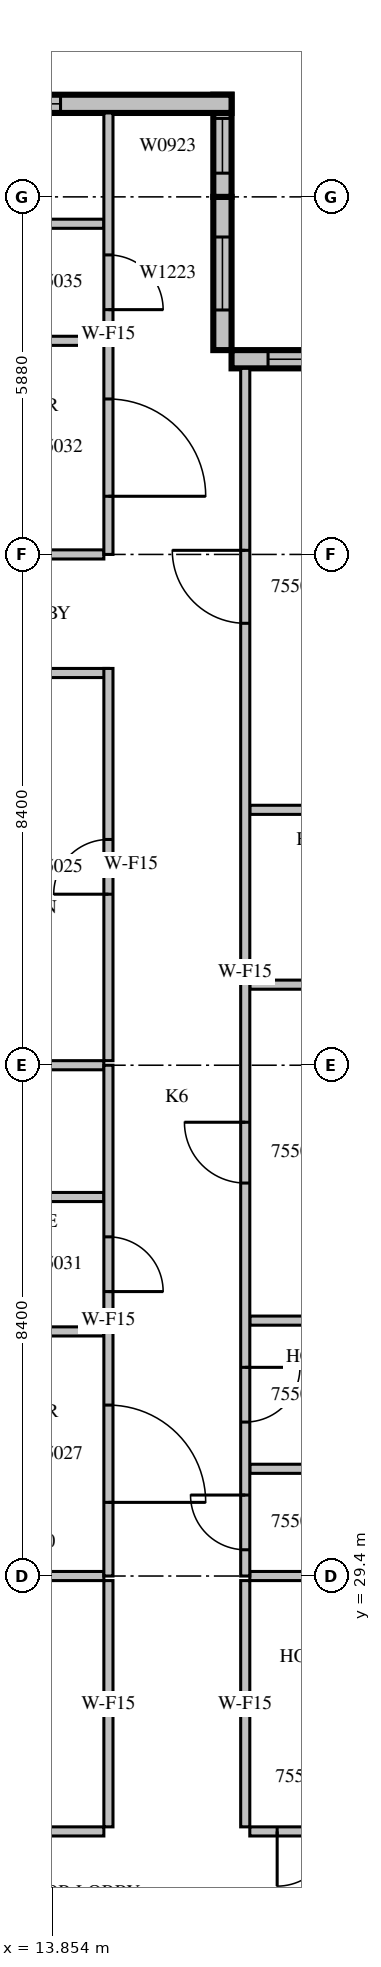
"""IFC4 building model, lengths in metres.
Left out: names, types, materials, properties, quantities, classifications, styles, units other than length and angle.
Written with IfcOpenShell. Run it as: python <this file> out.ifc"""

import sys

from ifc_helpers import new_model, si_unit, direction, frame, frame_2d, origin, place, context, subcontext, project, spatial, rectangle, extrude, source, transform, mapped, element, fill, save


model = new_model("IFC4")
c1 = context("Model", 3, precision=1e-05, world=origin(), true_north=direction((0.0, 1.0)))
c2 = subcontext(c1, "Body", "Model", "MODEL_VIEW")
j1 = project(units=[si_unit("LENGTHUNIT", "METRE"), si_unit("PLANEANGLEUNIT", "RADIAN")], contexts=[c1])
p1 = place(None, origin())
s1 = spatial("IfcSite", under=j1, at=p1, CompositionType="ELEMENT")
p2 = place(p1, origin())
s2 = spatial("IfcBuilding", under=s1, at=p2, CompositionType="ELEMENT")
p3 = place(p2, frame((0.0, 0.0, 242.4)))
s3 = spatial("IfcBuildingStorey", under=s2, at=p3, CompositionType="ELEMENT", Elevation=242.4)
m1 = source(origin(), c2, "Body", "SweptSolid", [
    extrude(rectangle(XDim=4.2, YDim=0.3, at=frame_2d((2.1, 0.0))), origin(), (0.0, 0.0, 1.0), 3.4),
])
p4 = place(p3, frame((21.0, 49.41, 0.0), z_axis=(0.0, 0.0, 1.0), x_axis=(-1.0, 0.0, 0.0)))
e1 = element("IfcWall", 1, at=p4, inside=s3, PredefinedType="STANDARD", context=c2, shape_type="MappedRepresentation", body=[
    mapped(m1, transform((0.0, 0.0, 0.0), scale=1.0)),
])
m2 = source(origin(), c2, "Body", "SweptSolid", [
    extrude(rectangle(XDim=3.0, YDim=2.3, at=frame_2d((1.5, 1.15))), frame((0.0, 0.16, 0.0), z_axis=(0.0, -1.0, 0.0), x_axis=(1.0, 0.0, 0.0)), (0.0, 0.0, 1.0), 0.32),
])
p5 = place(p4, frame((0.6, 0.0, 0.6)))
e2 = element("IfcOpeningElement", 2, at=p5, cuts=e1, PredefinedType="OPENING", context=c2, shape_type="MappedRepresentation", body=[
    mapped(m2, transform((0.0, 0.0, 0.0), scale=1.0)),
])
m3 = source(origin(), c2, "Body", "SweptSolid", [
    extrude(rectangle(XDim=2.52, YDim=0.3, at=frame_2d((1.26, 0.0))), origin(), (0.0, 0.0, 1.0), 3.4),
])
p6 = place(p3, frame((16.65, 49.56, 0.0), z_axis=(0.0, 0.0, 1.0), x_axis=(0.0, 1.0, 0.0)))
e3 = element("IfcWall", 3, at=p6, inside=s3, PredefinedType="STANDARD", context=c2, shape_type="MappedRepresentation", body=[
    mapped(m3, transform((0.0, 0.0, 0.0), scale=1.0)),
])
m4 = source(origin(), c2, "Body", "SweptSolid", [
    extrude(rectangle(XDim=1.2, YDim=2.3, at=frame_2d((0.6, 1.15))), frame((0.0, 0.16, 0.0), z_axis=(0.0, -1.0, 0.0), x_axis=(1.0, 0.0, 0.0)), (0.0, 0.0, 1.0), 0.32),
])
p7 = place(p6, frame((0.66, 0.0, 0.6)))
e4 = element("IfcOpeningElement", 4, at=p7, cuts=e3, PredefinedType="OPENING", context=c2, shape_type="MappedRepresentation", body=[
    mapped(m4, transform((0.0, 0.0, 0.0), scale=1.0)),
])
m5 = source(origin(), c2, "Body", "SweptSolid", [
    extrude(rectangle(XDim=1.68, YDim=0.3, at=frame_2d((0.84, 0.0))), origin(), (0.0, 0.0, 1.0), 3.4),
])
p8 = place(p3, frame((16.65, 52.08, 0.0), z_axis=(0.0, 0.0, 1.0), x_axis=(0.0, 1.0, 0.0)))
e5 = element("IfcWall", 5, at=p8, inside=s3, PredefinedType="STANDARD", context=c2, shape_type="MappedRepresentation", body=[
    mapped(m5, transform((0.0, 0.0, 0.0), scale=1.0)),
])
m6 = source(origin(), c2, "Body", "SweptSolid", [
    extrude(rectangle(XDim=0.9, YDim=2.3, at=frame_2d((0.45, 1.15))), frame((0.0, 0.16, 0.0), z_axis=(0.0, -1.0, 0.0), x_axis=(1.0, 0.0, 0.0)), (0.0, 0.0, 1.0), 0.32),
])
p9 = place(p8, frame((0.39, 0.0, 0.6)))
e6 = element("IfcOpeningElement", 6, at=p9, cuts=e5, PredefinedType="OPENING", context=c2, shape_type="MappedRepresentation", body=[
    mapped(m6, transform((0.0, 0.0, 0.0), scale=1.0)),
])
m7 = source(origin(), c2, "Body", "SweptSolid", [
    extrude(rectangle(XDim=10.5, YDim=0.3, at=frame_2d((5.25, 0.0))), origin(), (0.0, 0.0, 1.0), 3.4),
])
p10 = place(p3, frame((16.8, 53.61, 0.0), z_axis=(0.0, 0.0, 1.0), x_axis=(-1.0, 0.0, 0.0)))
e7 = element("IfcWall", 7, at=p10, inside=s3, PredefinedType="STANDARD", context=c2, shape_type="MappedRepresentation", body=[
    mapped(m7, transform((0.0, 0.0, 0.0), scale=1.0)),
])
m8 = source(origin(), c2, "Body", "SweptSolid", [
    extrude(rectangle(XDim=1.8, YDim=2.3, at=frame_2d((0.9, 1.15))), frame((0.0, 0.16, 0.0), z_axis=(0.0, -1.0, 0.0), x_axis=(1.0, 0.0, 0.0)), (0.0, 0.0, 1.0), 0.32),
])
p11 = place(p10, frame((8.025, 0.0, 0.6)))
e8 = element("IfcOpeningElement", 8, at=p11, cuts=e7, PredefinedType="OPENING", context=c2, shape_type="MappedRepresentation", body=[
    mapped(m8, transform((0.0, 0.0, 0.0), scale=1.0)),
])
m9 = source(origin(), c2, "Body", "SweptSolid", [
    extrude(rectangle(XDim=2.4, YDim=2.3, at=frame_2d((1.2, 1.15))), frame((0.0, 0.16, 0.0), z_axis=(0.0, -1.0, 0.0), x_axis=(1.0, 0.0, 0.0)), (0.0, 0.0, 1.0), 0.32),
])
p12 = place(p10, frame((2.812, 0.0, 0.6)))
e9 = element("IfcOpeningElement", 9, at=p12, cuts=e7, PredefinedType="OPENING", context=c2, shape_type="MappedRepresentation", body=[
    mapped(m9, transform((0.0, 0.0, 0.0), scale=1.0)),
])
m10 = source(origin(), c2, "Body", "SweptSolid", [
    extrude(rectangle(XDim=8.195, YDim=0.15, at=frame_2d((4.098, 0.0))), origin(), (0.0, 0.0, 1.0), 3.4),
])
p13 = place(p3, frame((6.505, 25.2, 0.0), z_axis=(0.0, 0.0, 1.0), x_axis=(1.0, 0.0, 0.0)))
e10 = element("IfcWall", 10, at=p13, inside=s3, PredefinedType="PARTITIONING", context=c2, shape_type="MappedRepresentation", body=[
    mapped(m10, transform((0.0, 0.0, 0.0), scale=1.0)),
])
m11 = source(origin(), c2, "Body", "SweptSolid", [
    extrude(rectangle(XDim=0.9, YDim=2.1, at=frame_2d((0.45, 1.05))), frame((0.0, 0.085, 0.0), z_axis=(0.0, -1.0, 0.0), x_axis=(1.0, 0.0, 0.0)), (0.0, 0.0, 1.0), 0.17),
])
p14 = place(p13, frame((1.045, 0.0, 0.0)))
e11 = element("IfcOpeningElement", 11, at=p14, cuts=e10, PredefinedType="OPENING", context=c2, shape_type="MappedRepresentation", body=[
    mapped(m11, transform((0.0, 0.0, 0.0), scale=1.0)),
])
p15 = place(p13, frame((5.97, 0.0, 0.0)))
e12 = element("IfcOpeningElement", 12, at=p15, cuts=e10, PredefinedType="OPENING", context=c2, shape_type="MappedRepresentation", body=[
    mapped(m11, transform((0.0, 0.0, 0.0), scale=1.0)),
])
m12 = source(origin(), c2, "Body", "SweptSolid", [
    extrude(rectangle(XDim=3.6, YDim=0.15, at=frame_2d((1.8, 0.0))), origin(), (0.0, 0.0, 1.0), 3.4),
])
p16 = place(p3, frame((17.1, 25.2, 0.0), z_axis=(0.0, 0.0, 1.0), x_axis=(1.0, 0.0, 0.0)))
e13 = element("IfcWall", 13, at=p16, inside=s3, PredefinedType="PARTITIONING", context=c2, shape_type="MappedRepresentation", body=[
    mapped(m12, transform((0.0, 0.0, 0.0), scale=1.0)),
])
p17 = place(p16, frame((0.45, 0.0, 0.0)))
e14 = element("IfcOpeningElement", 14, at=p17, cuts=e13, PredefinedType="OPENING", context=c2, shape_type="MappedRepresentation", body=[
    mapped(m11, transform((0.0, 0.0, 0.0), scale=1.0)),
])
m13 = source(origin(), c2, "Body", "SweptSolid", [
    extrude(rectangle(XDim=4.05, YDim=0.15, at=frame_2d((2.025, 0.0))), origin(), (0.0, 0.0, 1.0), 3.4),
])
for number, where, z_axis, x_axis in (
    (15, (14.775, 25.275, 0.0), (0.0, 0.0, 1.0), (0.0, 1.0, 0.0)),
    (16, (17.025, 29.325, 0.0), (0.0, 0.0, 1.0), (0.0, -1.0, 0.0)),
):
    element("IfcWall", number, at=place(p3, frame(where, z_axis=z_axis, x_axis=x_axis)), inside=s3, PredefinedType="PARTITIONING", context=c2, shape_type="MappedRepresentation", body=[
        mapped(m13, transform((0.0, 0.0, 0.0), scale=1.0)),
    ])
m14 = source(origin(), c2, "Body", "SweptSolid", [
    extrude(rectangle(XDim=3.801, YDim=0.15, at=frame_2d((1.901, 0.0))), origin(), (0.0, 0.0, 1.0), 3.4),
])
p18 = place(p3, frame((14.7, 29.4, 0.0), z_axis=(0.0, 0.0, 1.0), x_axis=(-1.0, 0.0, 0.0)))
e17 = element("IfcWall", 17, at=p18, inside=s3, PredefinedType="PARTITIONING", context=c2, shape_type="MappedRepresentation", body=[
    mapped(m14, transform((0.0, 0.0, 0.0), scale=1.0)),
])
m15 = source(origin(), c2, "Body", "SweptSolid", [
    extrude(rectangle(XDim=3.101, YDim=0.15, at=frame_2d((1.55, 0.0))), origin(), (0.0, 0.0, 1.0), 3.4),
])
p19 = place(p3, frame((20.201, 29.4, 0.0), z_axis=(0.0, 0.0, 1.0), x_axis=(-1.0, 0.0, 0.0)))
e18 = element("IfcWall", 18, at=p19, inside=s3, PredefinedType="PARTITIONING", context=c2, shape_type="MappedRepresentation", body=[
    mapped(m15, transform((0.0, 0.0, 0.0), scale=1.0)),
])
m16 = source(origin(), c2, "Body", "SweptSolid", [
    extrude(rectangle(XDim=3.275, YDim=0.15, at=frame_2d((1.637, 0.0))), origin(), (0.0, 0.0, 1.0), 3.4),
])
p20 = place(p3, frame((14.775, 44.25, 0.0), z_axis=(0.0, 0.0, 1.0), x_axis=(-1.0, 0.0, 0.0)))
e19 = element("IfcWall", 19, at=p20, inside=s3, PredefinedType="PARTITIONING", context=c2, shape_type="MappedRepresentation", body=[
    mapped(m16, transform((0.0, 0.0, 0.0), scale=1.0)),
])
m17 = source(origin(), c2, "Body", "SweptSolid", [
    extrude(rectangle(XDim=6.45, YDim=0.15, at=frame_2d((3.225, 0.0))), origin(), (0.0, 0.0, 1.0), 3.4),
])
p21 = place(p3, frame((14.775, 37.875, 0.0), z_axis=(0.0, 0.0, 1.0), x_axis=(0.0, 1.0, 0.0)))
e20 = element("IfcWall", 20, at=p21, inside=s3, PredefinedType="PARTITIONING", context=c2, shape_type="MappedRepresentation", body=[
    mapped(m17, transform((0.0, 0.0, 0.0), scale=1.0)),
])
p22 = place(p21, frame((2.737, 0.0, 0.0)))
e21 = element("IfcOpeningElement", 21, at=p22, cuts=e20, PredefinedType="OPENING", context=c2, shape_type="MappedRepresentation", body=[
    mapped(m11, transform((0.0, 0.0, 0.0), scale=1.0)),
])
m18 = source(origin(), c2, "Body", "SweptSolid", [
    extrude(rectangle(XDim=3.65, YDim=0.15, at=frame_2d((1.825, 0.0))), origin(), (0.0, 0.0, 1.0), 3.4),
])
for number, where, z_axis, x_axis in (
    (22, (14.7, 33.422, 0.0), (0.0, 0.0, 1.0), (-1.0, 0.0, 0.0)),
    (23, (14.7, 35.633, 0.0), (0.0, 0.0, 1.0), (-1.0, 0.0, 0.0)),
    (24, (14.7, 37.8, 0.0), (0.0, 0.0, 1.0), (-1.0, 0.0, 0.0)),
    (25, (14.7, 49.713, 0.0), (0.0, 0.0, 1.0), (-1.0, 0.0, 0.0)),
):
    element("IfcWall", number, at=place(p3, frame(where, z_axis=z_axis, x_axis=x_axis)), inside=s3, PredefinedType="PARTITIONING", context=c2, shape_type="MappedRepresentation", body=[
        mapped(m18, transform((0.0, 0.0, 0.0), scale=1.0)),
    ])
p23 = place(p3, frame((14.7, 51.638, 0.0), z_axis=(0.0, 0.0, 1.0), x_axis=(-1.0, 0.0, 0.0)))
e26 = element("IfcWall", 26, at=p23, inside=s3, PredefinedType="PARTITIONING", context=c2, shape_type="MappedRepresentation", body=[
    mapped(m18, transform((0.0, 0.0, 0.0), scale=1.0)),
])
p24 = place(p23, frame((1.375, 0.0, 0.0)))
e27 = element("IfcOpeningElement", 27, at=p24, cuts=e26, PredefinedType="OPENING", context=c2, shape_type="MappedRepresentation", body=[
    mapped(m11, transform((0.0, 0.0, 0.0), scale=1.0)),
])
p25 = place(p3, frame((14.7, 46.2, 0.0), z_axis=(0.0, 0.0, 1.0), x_axis=(-1.0, 0.0, 0.0)))
e28 = element("IfcWall", 28, at=p25, inside=s3, PredefinedType="PARTITIONING", context=c2, shape_type="MappedRepresentation", body=[
    mapped(m18, transform((0.0, 0.0, 0.0), scale=1.0)),
])
p26 = place(p3, frame((17.1, 31.163, 0.0), z_axis=(0.0, 0.0, 1.0), x_axis=(1.0, 0.0, 0.0)))
e29 = element("IfcWall", 29, at=p26, inside=s3, PredefinedType="PARTITIONING", context=c2, shape_type="MappedRepresentation", body=[
    mapped(m12, transform((0.0, 0.0, 0.0), scale=1.0)),
])
p27 = place(p3, frame((17.1, 39.125, 0.0), z_axis=(0.0, 0.0, 1.0), x_axis=(1.0, 0.0, 0.0)))
e30 = element("IfcWall", 30, at=p27, inside=s3, PredefinedType="PARTITIONING", context=c2, shape_type="MappedRepresentation", body=[
    mapped(m12, transform((0.0, 0.0, 0.0), scale=1.0)),
])
p28 = place(p27, frame((1.35, 0.0, 0.0)))
e31 = element("IfcOpeningElement", 31, at=p28, cuts=e30, PredefinedType="OPENING", context=c2, shape_type="MappedRepresentation", body=[
    mapped(m11, transform((0.0, 0.0, 0.0), scale=1.0)),
])
for number, where, z_axis, x_axis in (
    (32, (20.7, 33.6, 0.0), (0.0, 0.0, 1.0), (-1.0, 0.0, 0.0)),
    (33, (20.7, 42.0, 0.0), (0.0, 0.0, 1.0), (-1.0, 0.0, 0.0)),
):
    element("IfcWall", number, at=place(p3, frame(where, z_axis=z_axis, x_axis=x_axis)), inside=s3, PredefinedType="PARTITIONING", context=c2, shape_type="MappedRepresentation", body=[
        mapped(m12, transform((0.0, 0.0, 0.0), scale=1.0)),
    ])
m19 = source(origin(), c2, "Body", "SweptSolid", [
    extrude(rectangle(XDim=8.4, YDim=0.15, at=frame_2d((4.2, 0.0))), origin(), (0.0, 0.0, 1.0), 3.4),
])
p29 = place(p3, frame((14.775, 29.4, 0.0), z_axis=(0.0, 0.0, 1.0), x_axis=(0.0, 1.0, 0.0)))
e34 = element("IfcWall", 34, at=p29, inside=s3, PredefinedType="PARTITIONING", context=c2, shape_type="MappedRepresentation", body=[
    mapped(m19, transform((0.0, 0.0, 0.0), scale=1.0)),
])
m20 = source(origin(), c2, "Body", "SweptSolid", [
    extrude(rectangle(XDim=1.6, YDim=2.1, at=frame_2d((0.8, 1.05))), frame((0.0, 0.085, 0.0), z_axis=(0.0, -1.0, 0.0), x_axis=(1.0, 0.0, 0.0)), (0.0, 0.0, 1.0), 0.17),
])
p30 = place(p29, frame((1.211, 0.0, 0.0)))
e35 = element("IfcOpeningElement", 35, at=p30, cuts=e34, PredefinedType="OPENING", context=c2, shape_type="MappedRepresentation", body=[
    mapped(m20, transform((0.0, 0.0, 0.0), scale=1.0)),
])
p31 = place(p29, frame((4.678, 0.0, 0.0)))
e36 = element("IfcOpeningElement", 36, at=p31, cuts=e34, PredefinedType="OPENING", context=c2, shape_type="MappedRepresentation", body=[
    mapped(m11, transform((0.0, 0.0, 0.0), scale=1.0)),
])
m21 = source(origin(), c2, "Body", "SweptSolid", [
    extrude(rectangle(XDim=7.26, YDim=0.15, at=frame_2d((3.63, 0.0))), origin(), (0.0, 0.0, 1.0), 3.4),
])
p32 = place(p3, frame((14.775, 46.2, 0.0), z_axis=(0.0, 0.0, 1.0), x_axis=(0.0, 1.0, 0.0)))
e37 = element("IfcWall", 37, at=p32, inside=s3, PredefinedType="PARTITIONING", context=c2, shape_type="MappedRepresentation", body=[
    mapped(m21, transform((0.0, 0.0, 0.0), scale=1.0)),
])
p33 = place(p32, frame((0.956, 0.0, 0.0)))
e38 = element("IfcOpeningElement", 38, at=p33, cuts=e37, PredefinedType="OPENING", context=c2, shape_type="MappedRepresentation", body=[
    mapped(m20, transform((0.0, 0.0, 0.0), scale=1.0)),
])
p34 = place(p32, frame((4.025, 0.0, 0.0)))
e39 = element("IfcOpeningElement", 39, at=p34, cuts=e37, PredefinedType="OPENING", context=c2, shape_type="MappedRepresentation", body=[
    mapped(m11, transform((0.0, 0.0, 0.0), scale=1.0)),
])
m22 = source(origin(), c2, "Body", "SweptSolid", [
    extrude(rectangle(XDim=19.86, YDim=0.15, at=frame_2d((9.93, 0.0))), origin(), (0.0, 0.0, 1.0), 3.4),
])
p35 = place(p3, frame((17.025, 49.26, 0.0), z_axis=(0.0, 0.0, 1.0), x_axis=(0.0, -1.0, 0.0)))
e40 = element("IfcWall", 40, at=p35, inside=s3, PredefinedType="PARTITIONING", context=c2, shape_type="MappedRepresentation", body=[
    mapped(m22, transform((0.0, 0.0, 0.0), scale=1.0)),
])
p36 = place(p35, frame((18.528, 0.0, 0.0)))
e41 = element("IfcOpeningElement", 41, at=p36, cuts=e40, PredefinedType="OPENING", context=c2, shape_type="MappedRepresentation", body=[
    mapped(m11, transform((0.0, 0.0, 0.0), scale=1.0)),
])
p37 = place(p35, frame((16.428, 0.0, 0.0)))
e42 = element("IfcOpeningElement", 42, at=p37, cuts=e40, PredefinedType="OPENING", context=c2, shape_type="MappedRepresentation", body=[
    mapped(m11, transform((0.0, 0.0, 0.0), scale=1.0)),
])
m23 = source(origin(), c2, "Body", "SweptSolid", [
    extrude(rectangle(XDim=1.0, YDim=2.1, at=frame_2d((0.5, 1.05))), frame((0.0, 0.085, 0.0), z_axis=(0.0, -1.0, 0.0), x_axis=(1.0, 0.0, 0.0)), (0.0, 0.0, 1.0), 0.17),
])
p38 = place(p35, frame((12.398, 0.0, 0.0)))
e43 = element("IfcOpeningElement", 43, at=p38, cuts=e40, PredefinedType="OPENING", context=c2, shape_type="MappedRepresentation", body=[
    mapped(m23, transform((0.0, 0.0, 0.0), scale=1.0)),
])
m24 = source(origin(), c2, "Body", "SweptSolid", [
    extrude(rectangle(XDim=1.2, YDim=2.1, at=frame_2d((0.6, 1.05))), frame((0.0, 0.085, 0.0), z_axis=(0.0, -1.0, 0.0), x_axis=(1.0, 0.0, 0.0)), (0.0, 0.0, 1.0), 0.17),
])
p39 = place(p35, frame((2.993, 0.0, 0.0)))
e44 = element("IfcOpeningElement", 44, at=p39, cuts=e40, PredefinedType="OPENING", context=c2, shape_type="MappedRepresentation", body=[
    mapped(m24, transform((0.0, 0.0, 0.0), scale=1.0)),
])
m25 = source(origin(), c2, "Body", "SweptSolid", [
    extrude(rectangle(XDim=3.0, YDim=2.3, at=frame_2d((1.5, 1.15))), frame((0.0, 0.03, 0.0), z_axis=(0.0, -1.0, 0.0), x_axis=(1.0, 0.0, 0.0)), (0.0, 0.0, 1.0), 0.06),
])
p40 = place(p5, origin())
e45 = element("IfcWindow", 45, at=p40, inside=s3, PartitioningType="SINGLE_PANEL", PredefinedType="WINDOW", context=c2, shape_type="MappedRepresentation", body=[
    mapped(m25, transform((0.0, 0.0, 0.0), scale=1.0)),
])
fill(e2, e45)
m26 = source(origin(), c2, "Body", "SweptSolid", [
    extrude(rectangle(XDim=1.2, YDim=2.3, at=frame_2d((0.6, 1.15))), frame((0.0, 0.03, 0.0), z_axis=(0.0, -1.0, 0.0), x_axis=(1.0, 0.0, 0.0)), (0.0, 0.0, 1.0), 0.06),
])
p41 = place(p7, origin())
e46 = element("IfcWindow", 46, at=p41, inside=s3, PartitioningType="SINGLE_PANEL", PredefinedType="WINDOW", context=c2, shape_type="MappedRepresentation", body=[
    mapped(m26, transform((0.0, 0.0, 0.0), scale=1.0)),
])
fill(e4, e46)
m27 = source(origin(), c2, "Body", "SweptSolid", [
    extrude(rectangle(XDim=0.9, YDim=2.3, at=frame_2d((0.45, 1.15))), frame((0.0, 0.03, 0.0), z_axis=(0.0, -1.0, 0.0), x_axis=(1.0, 0.0, 0.0)), (0.0, 0.0, 1.0), 0.06),
])
p42 = place(p9, origin())
e47 = element("IfcWindow", 47, at=p42, inside=s3, PartitioningType="SINGLE_PANEL", PredefinedType="WINDOW", context=c2, shape_type="MappedRepresentation", body=[
    mapped(m27, transform((0.0, 0.0, 0.0), scale=1.0)),
])
fill(e6, e47)
m28 = source(origin(), c2, "Body", "SweptSolid", [
    extrude(rectangle(XDim=2.4, YDim=2.3, at=frame_2d((1.2, 1.15))), frame((0.0, 0.03, 0.0), z_axis=(0.0, -1.0, 0.0), x_axis=(1.0, 0.0, 0.0)), (0.0, 0.0, 1.0), 0.06),
])
p43 = place(p12, origin())
e48 = element("IfcWindow", 48, at=p43, inside=s3, PartitioningType="SINGLE_PANEL", PredefinedType="WINDOW", context=c2, shape_type="MappedRepresentation", body=[
    mapped(m28, transform((0.0, 0.0, 0.0), scale=1.0)),
])
fill(e9, e48)
m29 = source(origin(), c2, "Body", "SweptSolid", [
    extrude(rectangle(XDim=0.9, YDim=2.1, at=frame_2d((0.45, 1.05))), frame((0.0, 0.025, 0.0), z_axis=(0.0, -1.0, 0.0), x_axis=(1.0, 0.0, 0.0)), (0.0, 0.0, 1.0), 0.05),
])
p44 = place(p17, origin())
e49 = element("IfcDoor", 49, at=p44, inside=s3, OperationType="SINGLE_SWING_RIGHT", PredefinedType="DOOR", context=c2, shape_type="MappedRepresentation", body=[
    mapped(m29, transform((0.0, 0.0, 0.0), scale=1.0)),
])
fill(e14, e49)
p45 = place(p22, origin())
e50 = element("IfcDoor", 50, at=p45, inside=s3, OperationType="SINGLE_SWING_LEFT", PredefinedType="DOOR", context=c2, shape_type="MappedRepresentation", body=[
    mapped(m29, transform((0.0, 0.0, 0.0), scale=1.0)),
])
fill(e21, e50)
m30 = source(origin(), c2, "Body", "SweptSolid", [
    extrude(rectangle(XDim=1.6, YDim=2.1, at=frame_2d((0.8, 1.05))), frame((0.0, 0.025, 0.0), z_axis=(0.0, -1.0, 0.0), x_axis=(1.0, 0.0, 0.0)), (0.0, 0.0, 1.0), 0.05),
])
p46 = place(p30, origin())
e51 = element("IfcDoor", 51, at=p46, inside=s3, OperationType="SINGLE_SWING_RIGHT", PredefinedType="DOOR", context=c2, shape_type="MappedRepresentation", body=[
    mapped(m30, transform((0.0, 0.0, 0.0), scale=1.0)),
])
fill(e35, e51)
p47 = place(p31, origin())
e52 = element("IfcDoor", 52, at=p47, inside=s3, OperationType="SINGLE_SWING_RIGHT", PredefinedType="DOOR", context=c2, shape_type="MappedRepresentation", body=[
    mapped(m29, transform((0.0, 0.0, 0.0), scale=1.0)),
])
fill(e36, e52)
p48 = place(p33, origin())
e53 = element("IfcDoor", 53, at=p48, inside=s3, OperationType="SINGLE_SWING_RIGHT", PredefinedType="DOOR", context=c2, shape_type="MappedRepresentation", body=[
    mapped(m30, transform((0.0, 0.0, 0.0), scale=1.0)),
])
fill(e38, e53)
p49 = place(p34, origin())
e54 = element("IfcDoor", 54, at=p49, inside=s3, OperationType="SINGLE_SWING_RIGHT", PredefinedType="DOOR", context=c2, shape_type="MappedRepresentation", body=[
    mapped(m29, transform((0.0, 0.0, 0.0), scale=1.0)),
])
fill(e39, e54)
p50 = place(p36, origin())
e55 = element("IfcDoor", 55, at=p50, inside=s3, OperationType="SINGLE_SWING_RIGHT", PredefinedType="DOOR", context=c2, shape_type="MappedRepresentation", body=[
    mapped(m29, transform((0.0, 0.0, 0.0), scale=1.0)),
])
fill(e41, e55)
p51 = place(p37, origin())
e56 = element("IfcDoor", 56, at=p51, inside=s3, OperationType="SINGLE_SWING_LEFT", PredefinedType="DOOR", context=c2, shape_type="MappedRepresentation", body=[
    mapped(m29, transform((0.0, 0.0, 0.0), scale=1.0)),
])
fill(e42, e56)
m31 = source(origin(), c2, "Body", "SweptSolid", [
    extrude(rectangle(XDim=1.0, YDim=2.1, at=frame_2d((0.5, 1.05))), frame((0.0, 0.025, 0.0), z_axis=(0.0, -1.0, 0.0), x_axis=(1.0, 0.0, 0.0)), (0.0, 0.0, 1.0), 0.05),
])
p52 = place(p38, origin())
e57 = element("IfcDoor", 57, at=p52, inside=s3, OperationType="SINGLE_SWING_RIGHT", PredefinedType="DOOR", context=c2, shape_type="MappedRepresentation", body=[
    mapped(m31, transform((0.0, 0.0, 0.0), scale=1.0)),
])
fill(e43, e57)
m32 = source(origin(), c2, "Body", "SweptSolid", [
    extrude(rectangle(XDim=1.2, YDim=2.1, at=frame_2d((0.6, 1.05))), frame((0.0, 0.025, 0.0), z_axis=(0.0, -1.0, 0.0), x_axis=(1.0, 0.0, 0.0)), (0.0, 0.0, 1.0), 0.05),
])
p53 = place(p39, origin())
e58 = element("IfcDoor", 58, at=p53, inside=s3, OperationType="SINGLE_SWING_RIGHT", PredefinedType="DOOR", context=c2, shape_type="MappedRepresentation", body=[
    mapped(m32, transform((0.0, 0.0, 0.0), scale=1.0)),
])
fill(e44, e58)
save(model, sys.argv[1])
